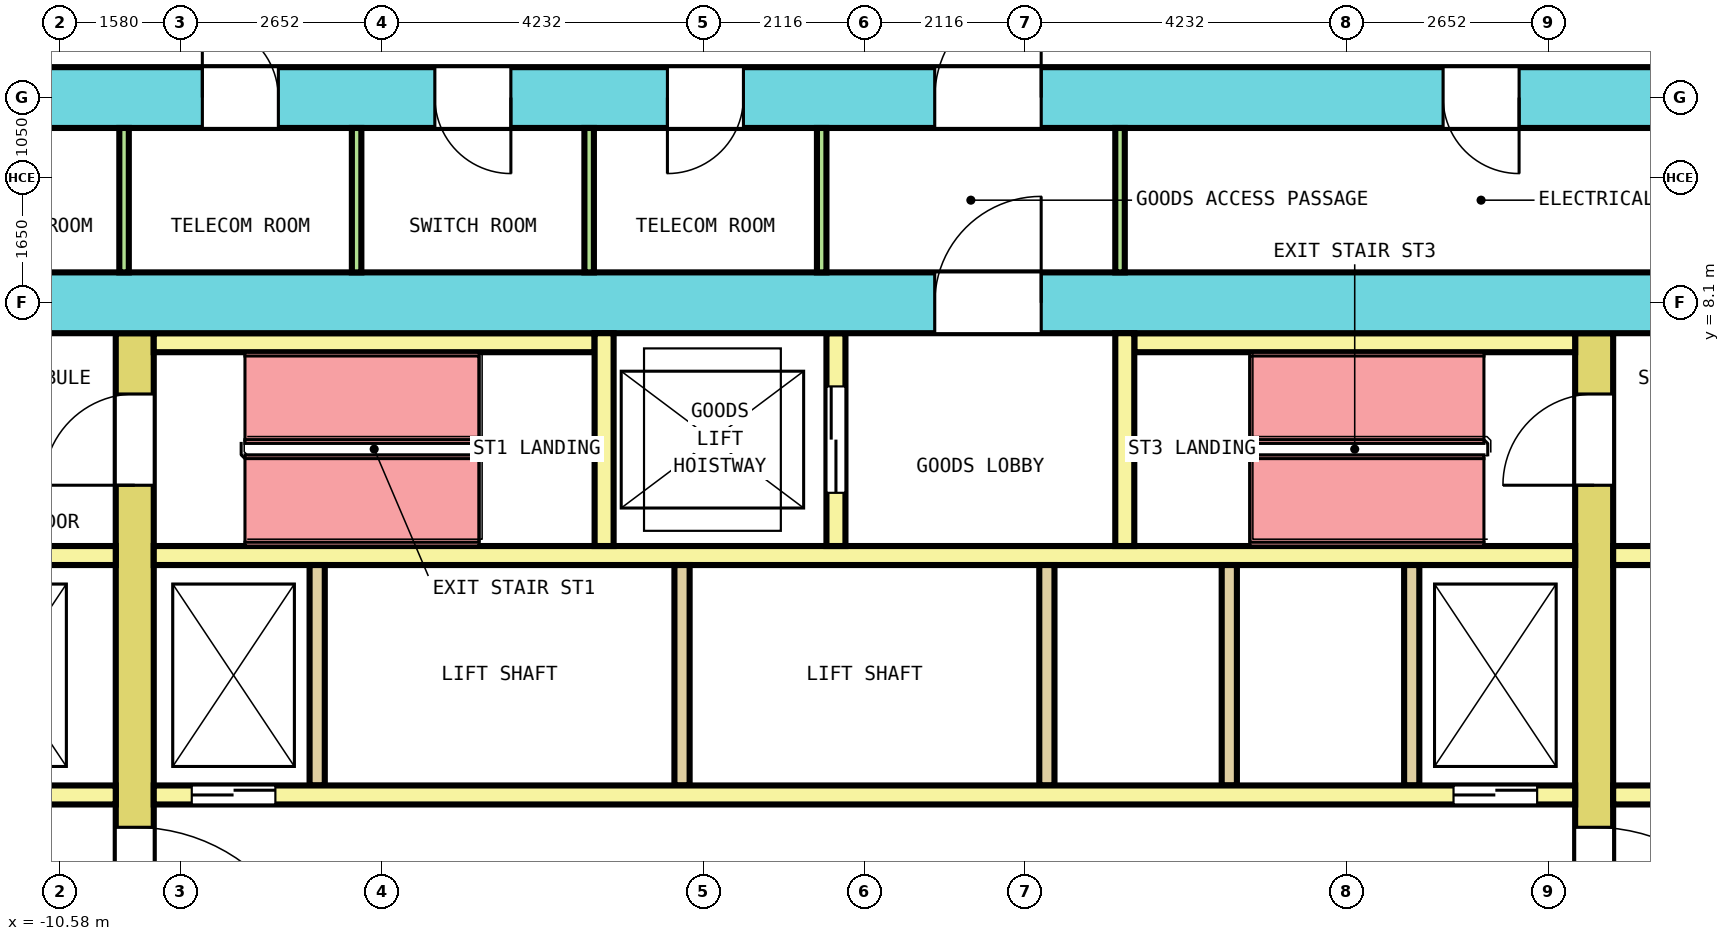
"""IFC4 building model, lengths in metres.
Left out: names, types, materials, properties, quantities, classifications, styles, units other than length and angle.
Written with IfcOpenShell. Run it as: python <this file> out.ifc"""

import sys

from ifc_helpers import new_model, si_unit, direction, frame, frame_2d, origin, place, context, subcontext, project, spatial, rectangle, extrude, element, fill, save


model = new_model("IFC4")
c1 = context("Model", 3, precision=1e-05, world=origin(), true_north=direction((0.0, 1.0)))
c2 = subcontext(c1, "Body", "Model", "MODEL_VIEW")
j1 = project(units=[si_unit("LENGTHUNIT", "METRE"), si_unit("PLANEANGLEUNIT", "RADIAN")], contexts=[c1])
p1 = place(None, origin())
s1 = spatial("IfcSite", under=j1, at=p1, CompositionType="ELEMENT")
p2 = place(p1, origin())
s2 = spatial("IfcBuilding", under=s1, at=p2, CompositionType="ELEMENT")
p3 = place(p2, frame((0.0, 0.0, 89.6)))
s3 = spatial("IfcBuildingStorey", under=s2, at=p3, CompositionType="ELEMENT", Elevation=89.6)
p4 = place(p3, frame((-13.6, 10.8, 0.0), z_axis=(0.0, 0.0, 1.0), x_axis=(1.0, 0.0, 0.0)))
e1 = element("IfcWall", 1, at=p4, inside=s3, PredefinedType="SHEAR", context=c2, shape_type="SweptSolid", body=[
    extrude(rectangle(XDim=27.2, YDim=0.8, at=frame_2d((13.6, 0.0))), origin(), (0.0, 0.0, 1.0), 4.1),
])
p5 = place(p4, frame((1.798, 0.0, 0.0)))
e2 = element("IfcOpeningElement", 2, at=p5, cuts=e1, PredefinedType="OPENING", context=c2, shape_type="SweptSolid", body=[
    extrude(rectangle(XDim=1.0, YDim=2.1, at=frame_2d((0.5, 1.05))), frame((0.0, 0.41, 0.0), z_axis=(0.0, -1.0, 0.0), x_axis=(1.0, 0.0, 0.0)), (0.0, 0.0, 1.0), 0.82),
])
p6 = place(p4, frame((4.889, 0.0, 0.0)))
e3 = element("IfcOpeningElement", 3, at=p6, cuts=e1, PredefinedType="OPENING", context=c2, shape_type="SweptSolid", body=[
    extrude(rectangle(XDim=1.0, YDim=2.1, at=frame_2d((0.5, 1.05))), frame((0.0, 0.41, 0.0), z_axis=(0.0, -1.0, 0.0), x_axis=(1.0, 0.0, 0.0)), (0.0, 0.0, 1.0), 0.82),
])
p7 = place(p4, frame((7.948, 0.0, 0.0)))
e4 = element("IfcOpeningElement", 4, at=p7, cuts=e1, PredefinedType="OPENING", context=c2, shape_type="SweptSolid", body=[
    extrude(rectangle(XDim=1.0, YDim=2.1, at=frame_2d((0.5, 1.05))), frame((0.0, 0.41, 0.0), z_axis=(0.0, -1.0, 0.0), x_axis=(1.0, 0.0, 0.0)), (0.0, 0.0, 1.0), 0.82),
])
p8 = place(p4, frame((11.008, 0.0, 0.0)))
e5 = element("IfcOpeningElement", 5, at=p8, cuts=e1, PredefinedType="OPENING", context=c2, shape_type="SweptSolid", body=[
    extrude(rectangle(XDim=1.0, YDim=2.1, at=frame_2d((0.5, 1.05))), frame((0.0, 0.41, 0.0), z_axis=(0.0, -1.0, 0.0), x_axis=(1.0, 0.0, 0.0)), (0.0, 0.0, 1.0), 0.82),
])
p9 = place(p4, frame((21.212, 0.0, 0.0)))
e6 = element("IfcOpeningElement", 6, at=p9, cuts=e1, PredefinedType="OPENING", context=c2, shape_type="SweptSolid", body=[
    extrude(rectangle(XDim=1.0, YDim=2.1, at=frame_2d((0.5, 1.05))), frame((0.0, 0.41, 0.0), z_axis=(0.0, -1.0, 0.0), x_axis=(1.0, 0.0, 0.0)), (0.0, 0.0, 1.0), 0.82),
])
p10 = place(p4, frame((14.525, 0.0, 0.0)))
e7 = element("IfcOpeningElement", 7, at=p10, cuts=e1, PredefinedType="OPENING", context=c2, shape_type="SweptSolid", body=[
    extrude(rectangle(XDim=1.4, YDim=2.1, at=frame_2d((0.7, 1.05))), frame((0.0, 0.41, 0.0), z_axis=(0.0, -1.0, 0.0), x_axis=(1.0, 0.0, 0.0)), (0.0, 0.0, 1.0), 0.82),
])
p11 = place(p3, frame((-12.8, 8.1, 0.0), z_axis=(0.0, 0.0, 1.0), x_axis=(1.0, 0.0, 0.0)))
e8 = element("IfcWall", 8, at=p11, inside=s3, PredefinedType="SHEAR", context=c2, shape_type="SweptSolid", body=[
    extrude(rectangle(XDim=25.6, YDim=0.8, at=frame_2d((12.8, 0.0))), origin(), (0.0, 0.0, 1.0), 4.1),
])
p12 = place(p11, frame((13.725, 0.0, 0.0)))
e9 = element("IfcOpeningElement", 9, at=p12, cuts=e8, PredefinedType="OPENING", context=c2, shape_type="SweptSolid", body=[
    extrude(rectangle(XDim=1.4, YDim=2.1, at=frame_2d((0.7, 1.05))), frame((0.0, 0.41, 0.0), z_axis=(0.0, -1.0, 0.0), x_axis=(1.0, 0.0, 0.0)), (0.0, 0.0, 1.0), 0.82),
])
p13 = place(p3, frame((-9.6, -7.7, 0.0), z_axis=(0.0, 0.0, 1.0), x_axis=(0.0, 1.0, 0.0)))
e10 = element("IfcWall", 10, at=p13, inside=s3, PredefinedType="SHEAR", context=c2, shape_type="SweptSolid", body=[
    extrude(rectangle(XDim=15.4, YDim=0.5, at=frame_2d((7.7, 0.0))), origin(), (0.0, 0.0, 1.0), 4.1),
])
p14 = place(p13, frame((6.5, 0.0, 0.0)))
e11 = element("IfcOpeningElement", 11, at=p14, cuts=e10, PredefinedType="OPENING", context=c2, shape_type="SweptSolid", body=[
    extrude(rectangle(XDim=2.4, YDim=2.1, at=frame_2d((1.2, 1.05))), frame((0.0, 0.26, 0.0), z_axis=(0.0, -1.0, 0.0), x_axis=(1.0, 0.0, 0.0)), (0.0, 0.0, 1.0), 0.52),
])
p15 = place(p13, frame((13.4, 0.0, 0.0)))
e12 = element("IfcOpeningElement", 12, at=p15, cuts=e10, PredefinedType="OPENING", context=c2, shape_type="SweptSolid", body=[
    extrude(rectangle(XDim=1.2, YDim=2.1, at=frame_2d((0.6, 1.05))), frame((0.0, 0.26, 0.0), z_axis=(0.0, -1.0, 0.0), x_axis=(1.0, 0.0, 0.0)), (0.0, 0.0, 1.0), 0.52),
])
p16 = place(p13, frame((0.8, 0.0, 0.0)))
e13 = element("IfcOpeningElement", 13, at=p16, cuts=e10, PredefinedType="OPENING", context=c2, shape_type="SweptSolid", body=[
    extrude(rectangle(XDim=1.2, YDim=2.1, at=frame_2d((0.6, 1.05))), frame((0.0, 0.26, 0.0), z_axis=(0.0, -1.0, 0.0), x_axis=(1.0, 0.0, 0.0)), (0.0, 0.0, 1.0), 0.52),
])
p17 = place(p3, frame((9.6, -7.7, 0.0), z_axis=(0.0, 0.0, 1.0), x_axis=(0.0, 1.0, 0.0)))
e14 = element("IfcWall", 14, at=p17, inside=s3, PredefinedType="SHEAR", context=c2, shape_type="SweptSolid", body=[
    extrude(rectangle(XDim=15.4, YDim=0.5, at=frame_2d((7.7, 0.0))), origin(), (0.0, 0.0, 1.0), 4.1),
])
p18 = place(p17, frame((6.5, 0.0, 0.0)))
e15 = element("IfcOpeningElement", 15, at=p18, cuts=e14, PredefinedType="OPENING", context=c2, shape_type="SweptSolid", body=[
    extrude(rectangle(XDim=2.4, YDim=2.1, at=frame_2d((1.2, 1.05))), frame((0.0, 0.26, 0.0), z_axis=(0.0, -1.0, 0.0), x_axis=(1.0, 0.0, 0.0)), (0.0, 0.0, 1.0), 0.52),
])
p19 = place(p17, frame((13.4, 0.0, 0.0)))
e16 = element("IfcOpeningElement", 16, at=p19, cuts=e14, PredefinedType="OPENING", context=c2, shape_type="SweptSolid", body=[
    extrude(rectangle(XDim=1.2, YDim=2.1, at=frame_2d((0.6, 1.05))), frame((0.0, 0.26, 0.0), z_axis=(0.0, -1.0, 0.0), x_axis=(1.0, 0.0, 0.0)), (0.0, 0.0, 1.0), 0.52),
])
p20 = place(p17, frame((0.9, 0.0, 0.0)))
e17 = element("IfcOpeningElement", 17, at=p20, cuts=e14, PredefinedType="OPENING", context=c2, shape_type="SweptSolid", body=[
    extrude(rectangle(XDim=1.0, YDim=2.1, at=frame_2d((0.5, 1.05))), frame((0.0, 0.26, 0.0), z_axis=(0.0, -1.0, 0.0), x_axis=(1.0, 0.0, 0.0)), (0.0, 0.0, 1.0), 0.52),
])
p21 = place(p3, frame((-12.8, 1.625, 0.0), z_axis=(0.0, 0.0, 1.0), x_axis=(1.0, 0.0, 0.0)))
e18 = element("IfcWall", 18, at=p21, inside=s3, PredefinedType="SOLIDWALL", context=c2, shape_type="SweptSolid", body=[
    extrude(rectangle(XDim=2.95, YDim=0.25, at=frame_2d((1.475, 0.0))), origin(), (0.0, 0.0, 1.0), 4.1),
])
p22 = place(p21, frame((0.925, 0.0, 0.0)))
e19 = element("IfcOpeningElement", 19, at=p22, cuts=e18, PredefinedType="OPENING", context=c2, shape_type="SweptSolid", body=[
    extrude(rectangle(XDim=1.1, YDim=2.1, at=frame_2d((0.55, 1.05))), frame((0.0, 0.135, 0.0), z_axis=(0.0, -1.0, 0.0), x_axis=(1.0, 0.0, 0.0)), (0.0, 0.0, 1.0), 0.27),
])
p23 = place(p3, frame((-9.35, 1.625, 0.0), z_axis=(0.0, 0.0, 1.0), x_axis=(1.0, 0.0, 0.0)))
e20 = element("IfcWall", 20, at=p23, inside=s3, PredefinedType="SOLIDWALL", context=c2, shape_type="SweptSolid", body=[
    extrude(rectangle(XDim=18.7, YDim=0.25, at=frame_2d((9.35, 0.0))), origin(), (0.0, 0.0, 1.0), 4.1),
])
p24 = place(p23, frame((0.5, 0.0, 0.0)))
e21 = element("IfcOpeningElement", 21, at=p24, cuts=e20, PredefinedType="OPENING", context=c2, shape_type="SweptSolid", body=[
    extrude(rectangle(XDim=1.1, YDim=2.1, at=frame_2d((0.55, 1.05))), frame((0.0, 0.135, 0.0), z_axis=(0.0, -1.0, 0.0), x_axis=(1.0, 0.0, 0.0)), (0.0, 0.0, 1.0), 0.27),
])
p25 = place(p23, frame((17.1, 0.0, 0.0)))
e22 = element("IfcOpeningElement", 22, at=p25, cuts=e20, PredefinedType="OPENING", context=c2, shape_type="SweptSolid", body=[
    extrude(rectangle(XDim=1.1, YDim=2.1, at=frame_2d((0.55, 1.05))), frame((0.0, 0.135, 0.0), z_axis=(0.0, -1.0, 0.0), x_axis=(1.0, 0.0, 0.0)), (0.0, 0.0, 1.0), 0.27),
])
p26 = place(p3, frame((9.85, 1.625, 0.0), z_axis=(0.0, 0.0, 1.0), x_axis=(1.0, 0.0, 0.0)))
e23 = element("IfcWall", 23, at=p26, inside=s3, PredefinedType="SOLIDWALL", context=c2, shape_type="SweptSolid", body=[
    extrude(rectangle(XDim=2.95, YDim=0.25, at=frame_2d((1.475, 0.0))), origin(), (0.0, 0.0, 1.0), 4.1),
])
p27 = place(p26, frame((0.925, 0.0, 0.0)))
e24 = element("IfcOpeningElement", 24, at=p27, cuts=e23, PredefinedType="OPENING", context=c2, shape_type="SweptSolid", body=[
    extrude(rectangle(XDim=1.1, YDim=2.1, at=frame_2d((0.55, 1.05))), frame((0.0, 0.135, 0.0), z_axis=(0.0, -1.0, 0.0), x_axis=(1.0, 0.0, 0.0)), (0.0, 0.0, 1.0), 0.27),
])
p28 = place(p3, frame((-12.8, 4.775, 0.0), z_axis=(0.0, 0.0, 1.0), x_axis=(1.0, 0.0, 0.0)))
e25 = element("IfcWall", 25, at=p28, inside=s3, PredefinedType="SOLIDWALL", context=c2, shape_type="SweptSolid", body=[
    extrude(rectangle(XDim=2.95, YDim=0.25, at=frame_2d((1.475, 0.0))), origin(), (0.0, 0.0, 1.0), 4.1),
])
p29 = place(p3, frame((-9.35, 4.775, 0.0), z_axis=(0.0, 0.0, 1.0), x_axis=(1.0, 0.0, 0.0)))
e26 = element("IfcWall", 26, at=p29, inside=s3, PredefinedType="SOLIDWALL", context=c2, shape_type="SweptSolid", body=[
    extrude(rectangle(XDim=18.7, YDim=0.25, at=frame_2d((9.35, 0.0))), origin(), (0.0, 0.0, 1.0), 4.1),
])
p30 = place(p3, frame((9.85, 4.775, 0.0), z_axis=(0.0, 0.0, 1.0), x_axis=(1.0, 0.0, 0.0)))
e27 = element("IfcWall", 27, at=p30, inside=s3, PredefinedType="SOLIDWALL", context=c2, shape_type="SweptSolid", body=[
    extrude(rectangle(XDim=2.95, YDim=0.25, at=frame_2d((1.475, 0.0))), origin(), (0.0, 0.0, 1.0), 4.1),
])
for number, where, z_axis, x_axis in (
    (28, (-7.2, 1.75, 0.0), (0.0, 0.0, 1.0), (0.0, 1.0, 0.0)),
    (29, (-2.4, 1.75, 0.0), (0.0, 0.0, 1.0), (0.0, 1.0, 0.0)),
    (30, (2.4, 1.75, 0.0), (0.0, 0.0, 1.0), (0.0, 1.0, 0.0)),
    (31, (4.8, 1.75, 0.0), (0.0, 0.0, 1.0), (0.0, 1.0, 0.0)),
    (32, (7.2, 1.75, 0.0), (0.0, 0.0, 1.0), (0.0, 1.0, 0.0)),
):
    element("IfcWall", number, at=place(p3, frame(where, z_axis=z_axis, x_axis=x_axis)), inside=s3, PredefinedType="SOLIDWALL", context=c2, shape_type="SweptSolid", body=[
        extrude(rectangle(XDim=2.9, YDim=0.2, at=frame_2d((1.45, 0.0))), origin(), (0.0, 0.0, 1.0), 4.1),
    ])
for number, where, z_axis, x_axis in (
    (33, (-9.35, 7.575, 0.0), (0.0, 0.0, 1.0), (1.0, 0.0, 0.0)),
    (34, (3.55, 7.575, 0.0), (0.0, 0.0, 1.0), (1.0, 0.0, 0.0)),
):
    element("IfcWall", number, at=place(p3, frame(where, z_axis=z_axis, x_axis=x_axis)), inside=s3, PredefinedType="SOLIDWALL", context=c2, shape_type="SweptSolid", body=[
        extrude(rectangle(XDim=5.8, YDim=0.25, at=frame_2d((2.9, 0.0))), origin(), (0.0, 0.0, 1.0), 4.1),
    ])
p31 = place(p3, frame((-3.425, 4.9, 0.0), z_axis=(0.0, 0.0, 1.0), x_axis=(0.0, 1.0, 0.0)))
e35 = element("IfcWall", 35, at=p31, inside=s3, PredefinedType="SOLIDWALL", context=c2, shape_type="SweptSolid", body=[
    extrude(rectangle(XDim=2.8, YDim=0.25, at=frame_2d((1.4, 0.0))), origin(), (0.0, 0.0, 1.0), 4.1),
])
p32 = place(p3, frame((-0.375, 4.9, 0.0), z_axis=(0.0, 0.0, 1.0), x_axis=(0.0, 1.0, 0.0)))
e36 = element("IfcWall", 36, at=p32, inside=s3, PredefinedType="SOLIDWALL", context=c2, shape_type="SweptSolid", body=[
    extrude(rectangle(XDim=2.8, YDim=0.25, at=frame_2d((1.4, 0.0))), origin(), (0.0, 0.0, 1.0), 4.1),
])
p33 = place(p32, frame((0.7, 0.0, 0.0)))
e37 = element("IfcOpeningElement", 37, at=p33, cuts=e36, PredefinedType="OPENING", context=c2, shape_type="SweptSolid", body=[
    extrude(rectangle(XDim=1.4, YDim=2.1, at=frame_2d((0.7, 1.05))), frame((0.0, 0.135, 0.0), z_axis=(0.0, -1.0, 0.0), x_axis=(1.0, 0.0, 0.0)), (0.0, 0.0, 1.0), 0.27),
])
p34 = place(p3, frame((3.425, 4.9, 0.0), z_axis=(0.0, 0.0, 1.0), x_axis=(0.0, 1.0, 0.0)))
e38 = element("IfcWall", 38, at=p34, inside=s3, PredefinedType="SOLIDWALL", context=c2, shape_type="SweptSolid", body=[
    extrude(rectangle(XDim=2.8, YDim=0.25, at=frame_2d((1.4, 0.0))), origin(), (0.0, 0.0, 1.0), 4.1),
])
for number, where, z_axis, x_axis in (
    (39, (-9.74, 8.5, 0.0), (0.0, 0.0, 1.0), (0.0, 1.0, 0.0)),
    (40, (-6.681, 8.5, 0.0), (0.0, 0.0, 1.0), (0.0, 1.0, 0.0)),
    (41, (-3.622, 8.5, 0.0), (0.0, 0.0, 1.0), (0.0, 1.0, 0.0)),
    (42, (-0.562, 8.5, 0.0), (0.0, 0.0, 1.0), (0.0, 1.0, 0.0)),
    (43, (3.363, 8.5, 0.0), (0.0, 0.0, 1.0), (0.0, 1.0, 0.0)),
):
    element("IfcWall", number, at=place(p3, frame(where, z_axis=z_axis, x_axis=x_axis)), inside=s3, PredefinedType="PARTITIONING", context=c2, shape_type="SweptSolid", body=[
        extrude(rectangle(XDim=1.9, YDim=0.125, at=frame_2d((0.95, 0.0))), origin(), (0.0, 0.0, 1.0), 4.1),
    ])
p35 = place(p24, origin())
e44 = element("IfcDoor", 44, at=p35, inside=s3, OperationType="DOUBLE_DOOR_SLIDING", PredefinedType="DOOR", context=c2, shape_type="SweptSolid", body=[
    extrude(rectangle(XDim=1.1, YDim=2.1, at=frame_2d((0.55, 1.05))), frame((0.0, 0.075, 0.0), z_axis=(0.0, -1.0, 0.0), x_axis=(1.0, 0.0, 0.0)), (0.0, 0.0, 1.0), 0.15),
])
fill(e21, e44)
p36 = place(p25, origin())
e45 = element("IfcDoor", 45, at=p36, inside=s3, OperationType="DOUBLE_DOOR_SLIDING", PredefinedType="DOOR", context=c2, shape_type="SweptSolid", body=[
    extrude(rectangle(XDim=1.1, YDim=2.1, at=frame_2d((0.55, 1.05))), frame((0.0, 0.075, 0.0), z_axis=(0.0, -1.0, 0.0), x_axis=(1.0, 0.0, 0.0)), (0.0, 0.0, 1.0), 0.15),
])
fill(e22, e45)
p37 = place(p33, origin())
e46 = element("IfcDoor", 46, at=p37, inside=s3, OperationType="DOUBLE_DOOR_SLIDING", PredefinedType="DOOR", context=c2, shape_type="SweptSolid", body=[
    extrude(rectangle(XDim=1.4, YDim=2.1, at=frame_2d((0.7, 1.05))), frame((0.0, 0.075, 0.0), z_axis=(0.0, -1.0, 0.0), x_axis=(1.0, 0.0, 0.0)), (0.0, 0.0, 1.0), 0.15),
])
fill(e37, e46)
p38 = place(p14, origin())
e47 = element("IfcDoor", 47, at=p38, inside=s3, OperationType="DOUBLE_DOOR_SINGLE_SWING", PredefinedType="DOOR", context=c2, shape_type="SweptSolid", body=[
    extrude(rectangle(XDim=2.4, YDim=2.1, at=frame_2d((1.2, 1.05))), frame((0.0, 0.2, 0.0), z_axis=(0.0, -1.0, 0.0), x_axis=(1.0, 0.0, 0.0)), (0.0, 0.0, 1.0), 0.4),
])
fill(e11, e47)
p39 = place(p18, origin())
e48 = element("IfcDoor", 48, at=p39, inside=s3, OperationType="DOUBLE_DOOR_SINGLE_SWING", PredefinedType="DOOR", context=c2, shape_type="SweptSolid", body=[
    extrude(rectangle(XDim=2.4, YDim=2.1, at=frame_2d((1.2, 1.05))), frame((0.0, 0.2, 0.0), z_axis=(0.0, -1.0, 0.0), x_axis=(1.0, 0.0, 0.0)), (0.0, 0.0, 1.0), 0.4),
])
fill(e15, e48)
p40 = place(p15, origin())
e49 = element("IfcDoor", 49, at=p40, inside=s3, OperationType="SINGLE_SWING_LEFT", PredefinedType="DOOR", context=c2, shape_type="SweptSolid", body=[
    extrude(rectangle(XDim=1.2, YDim=2.1, at=frame_2d((0.6, 1.05))), frame((0.0, 0.2, 0.0), z_axis=(0.0, -1.0, 0.0), x_axis=(1.0, 0.0, 0.0)), (0.0, 0.0, 1.0), 0.4),
])
fill(e12, e49)
p41 = place(p19, origin())
e50 = element("IfcDoor", 50, at=p41, inside=s3, OperationType="SINGLE_SWING_LEFT", PredefinedType="DOOR", context=c2, shape_type="SweptSolid", body=[
    extrude(rectangle(XDim=1.2, YDim=2.1, at=frame_2d((0.6, 1.05))), frame((0.0, 0.2, 0.0), z_axis=(0.0, -1.0, 0.0), x_axis=(1.0, 0.0, 0.0)), (0.0, 0.0, 1.0), 0.4),
])
fill(e16, e50)
p42 = place(p12, origin())
e51 = element("IfcDoor", 51, at=p42, inside=s3, OperationType="DOUBLE_DOOR_SINGLE_SWING", PredefinedType="DOOR", context=c2, shape_type="SweptSolid", body=[
    extrude(rectangle(XDim=1.4, YDim=2.1, at=frame_2d((0.7, 1.05))), frame((0.0, 0.3, 0.0), z_axis=(0.0, -1.0, 0.0), x_axis=(1.0, 0.0, 0.0)), (0.0, 0.0, 1.0), 0.6),
])
fill(e9, e51)
p43 = place(p6, origin())
e52 = element("IfcDoor", 52, at=p43, inside=s3, OperationType="SINGLE_SWING_LEFT", PredefinedType="DOOR", context=c2, shape_type="SweptSolid", body=[
    extrude(rectangle(XDim=1.0, YDim=2.1, at=frame_2d((0.5, 1.05))), frame((0.0, 0.3, 0.0), z_axis=(0.0, -1.0, 0.0), x_axis=(1.0, 0.0, 0.0)), (0.0, 0.0, 1.0), 0.6),
])
fill(e3, e52)
p44 = place(p7, origin())
e53 = element("IfcDoor", 53, at=p44, inside=s3, OperationType="SINGLE_SWING_RIGHT", PredefinedType="DOOR", context=c2, shape_type="SweptSolid", body=[
    extrude(rectangle(XDim=1.0, YDim=2.1, at=frame_2d((0.5, 1.05))), frame((0.0, 0.3, 0.0), z_axis=(0.0, -1.0, 0.0), x_axis=(1.0, 0.0, 0.0)), (0.0, 0.0, 1.0), 0.6),
])
fill(e4, e53)
p45 = place(p8, origin())
e54 = element("IfcDoor", 54, at=p45, inside=s3, OperationType="SINGLE_SWING_LEFT", PredefinedType="DOOR", context=c2, shape_type="SweptSolid", body=[
    extrude(rectangle(XDim=1.0, YDim=2.1, at=frame_2d((0.5, 1.05))), frame((0.0, 0.3, 0.0), z_axis=(0.0, -1.0, 0.0), x_axis=(1.0, 0.0, 0.0)), (0.0, 0.0, 1.0), 0.6),
])
fill(e5, e54)
p46 = place(p9, origin())
e55 = element("IfcDoor", 55, at=p46, inside=s3, OperationType="SINGLE_SWING_RIGHT", PredefinedType="DOOR", context=c2, shape_type="SweptSolid", body=[
    extrude(rectangle(XDim=1.0, YDim=2.1, at=frame_2d((0.5, 1.05))), frame((0.0, 0.3, 0.0), z_axis=(0.0, -1.0, 0.0), x_axis=(1.0, 0.0, 0.0)), (0.0, 0.0, 1.0), 0.6),
])
fill(e6, e55)
p47 = place(p10, origin())
e56 = element("IfcDoor", 56, at=p47, inside=s3, OperationType="DOUBLE_DOOR_SINGLE_SWING", PredefinedType="DOOR", context=c2, shape_type="SweptSolid", body=[
    extrude(rectangle(XDim=1.4, YDim=2.1, at=frame_2d((0.7, 1.05))), frame((0.0, 0.3, 0.0), z_axis=(0.0, -1.0, 0.0), x_axis=(1.0, 0.0, 0.0)), (0.0, 0.0, 1.0), 0.6),
])
fill(e7, e56)
save(model, sys.argv[1])
